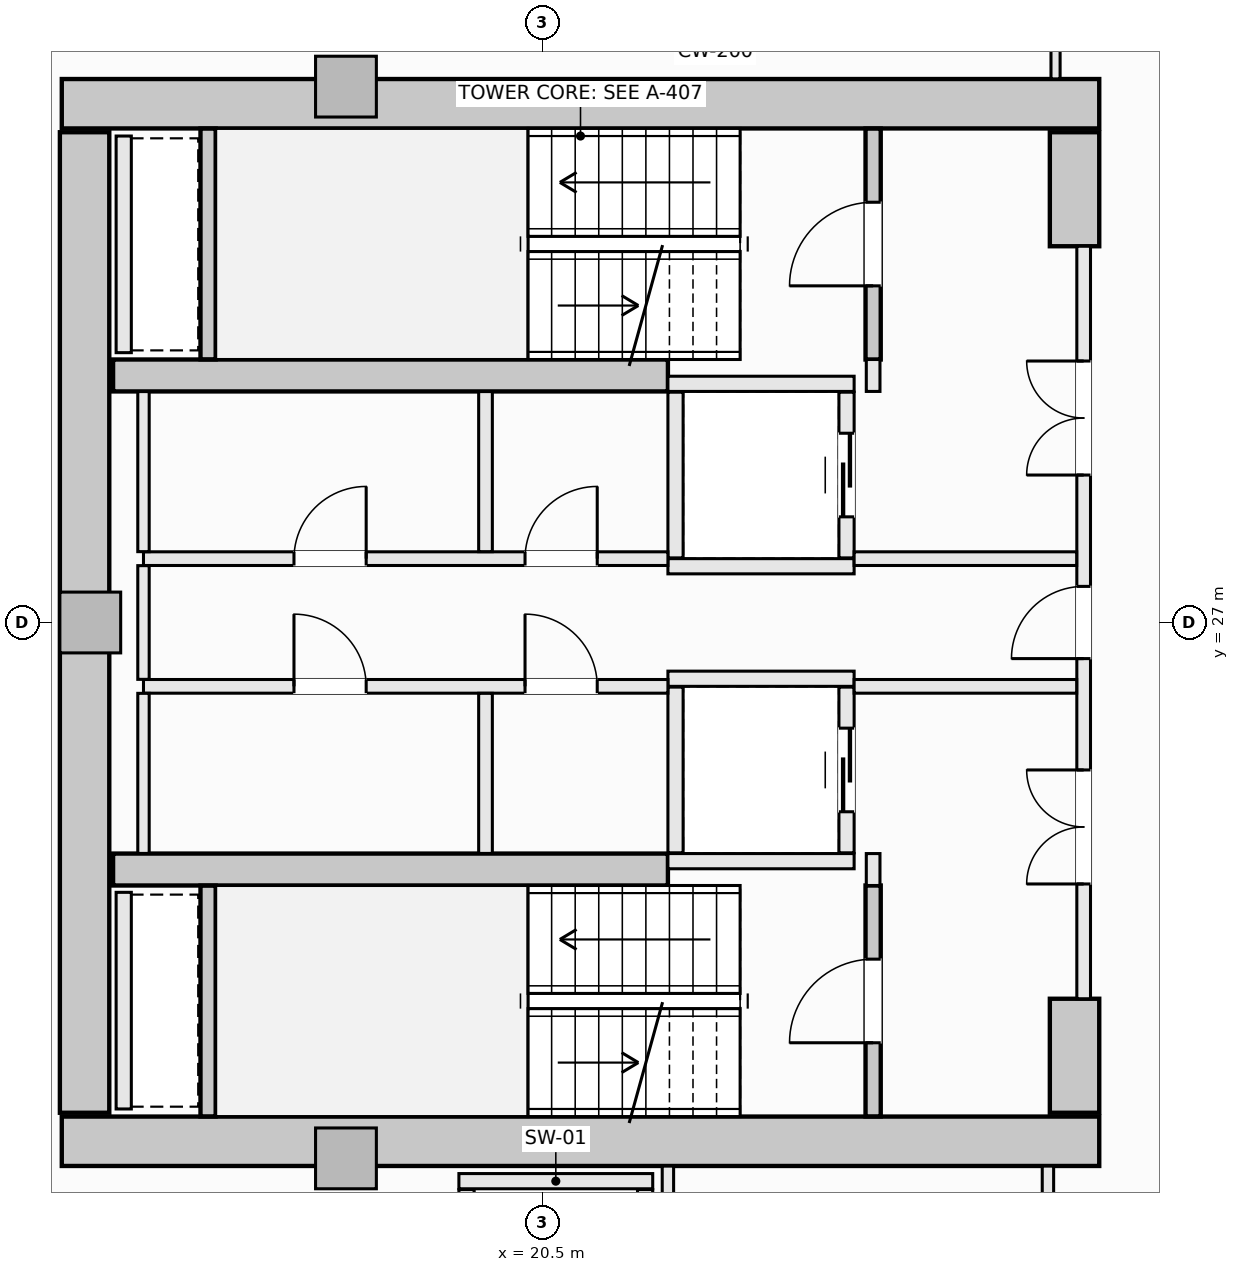
"""IFC4 building model, lengths in metres.
Left out: names, types, materials, properties, quantities, classifications, styles, units other than length and angle.
Written with IfcOpenShell. Run it as: python <this file> out.ifc"""

import sys

from ifc_helpers import new_model, si_unit, direction, frame, frame_2d, origin, origin_2d, place, context, subcontext, project, spatial, rectangle, extrude, element, fill, save


model = new_model("IFC4")
c1 = context("Model", 3, precision=1e-05, world=origin(), true_north=direction((0.0, 1.0)))
c2 = subcontext(c1, "Body", "Model", "MODEL_VIEW")
j1 = project(units=[si_unit("LENGTHUNIT", "METRE"), si_unit("PLANEANGLEUNIT", "RADIAN")], contexts=[c1])
p1 = place(None, origin())
s1 = spatial("IfcSite", under=j1, at=p1, CompositionType="ELEMENT")
p2 = place(p1, origin())
s2 = spatial("IfcBuilding", under=s1, at=p2, CompositionType="ELEMENT")
p3 = place(p2, frame((0.0, 0.0, 180.1)))
s3 = spatial("IfcBuildingStorey", under=s2, at=p3, CompositionType="ELEMENT", Elevation=180.1)
for number, where, z_axis, x_axis in (
    (1, (14.175, 33.825, -0.27), (0.0, 0.0, 1.0), (1.0, 0.0, 0.0)),
    (2, (14.175, 20.175, -0.27), (0.0, 0.0, 1.0), (1.0, 0.0, 0.0)),
):
    element("IfcWall", number, at=place(p3, frame(where, z_axis=z_axis, x_axis=x_axis)), inside=s3, PredefinedType="SHEAR", context=c2, shape_type="SweptSolid", body=[
        extrude(rectangle(XDim=13.65, YDim=0.65, at=frame_2d((6.825, 0.0))), origin(), (0.0, 0.0, 1.0), 3.4),
    ])
p4 = place(p3, frame((14.475, 20.55, -0.27), z_axis=(0.0, 0.0, 1.0), x_axis=(0.0, 1.0, 0.0)))
e3 = element("IfcWall", 3, at=p4, inside=s3, PredefinedType="SHEAR", context=c2, shape_type="SweptSolid", body=[
    extrude(rectangle(XDim=12.9, YDim=0.65, at=frame_2d((6.45, 0.0))), origin(), (0.0, 0.0, 1.0), 3.4),
])
for number, where, z_axis, x_axis in (
    (4, (27.5, 31.95, -0.27), (0.0, 0.0, 1.0), (0.0, 1.0, 0.0)),
    (5, (27.5, 20.55, -0.27), (0.0, 0.0, 1.0), (0.0, 1.0, 0.0)),
):
    element("IfcWall", number, at=place(p3, frame(where, z_axis=z_axis, x_axis=x_axis)), inside=s3, PredefinedType="SHEAR", context=c2, shape_type="SweptSolid", body=[
        extrude(rectangle(XDim=1.5, YDim=0.65, at=frame_2d((0.75, 0.0))), origin(), (0.0, 0.0, 1.0), 3.4),
    ])
for number, where, z_axis, x_axis in (
    (6, (14.85, 30.25, -0.27), (0.0, 0.0, 1.0), (1.0, 0.0, 0.0)),
    (7, (14.85, 23.75, -0.27), (0.0, 0.0, 1.0), (1.0, 0.0, 0.0)),
):
    element("IfcWall", number, at=place(p3, frame(where, z_axis=z_axis, x_axis=x_axis)), inside=s3, PredefinedType="SHEAR", context=c2, shape_type="SweptSolid", body=[
        extrude(rectangle(XDim=7.3, YDim=0.42, at=frame_2d((3.65, 0.0))), origin(), (0.0, 0.0, 1.0), 3.4),
    ])
for number, where, z_axis, x_axis in (
    (8, (17.914, 34.05, -0.27), (0.0, 0.0, 1.0), (1.0, 0.0, 0.0)),
    (9, (14.55, 27.0, -0.27), (0.0, 0.0, 1.0), (1.0, 0.0, 0.0)),
    (10, (17.914, 19.95, -0.27), (0.0, 0.0, 1.0), (1.0, 0.0, 0.0)),
):
    element("IfcColumn", number, at=place(p3, frame(where, z_axis=z_axis, x_axis=x_axis)), inside=s3, PredefinedType="PILASTER", context=c2, shape_type="SweptSolid", body=[
        extrude(rectangle(XDim=0.8, YDim=0.8, at=origin_2d()), origin(), (0.0, 0.0, 1.0), 3.4),
    ])
p5 = place(p3, frame((24.85, 30.46, -0.27), z_axis=(0.0, 0.0, 1.0), x_axis=(0.0, 1.0, 0.0)))
e11 = element("IfcWall", 11, at=p5, inside=s3, PredefinedType="SHEAR", context=c2, shape_type="SweptSolid", body=[
    extrude(rectangle(XDim=3.038, YDim=0.2, at=frame_2d((1.519, 0.0))), origin(), (0.0, 0.0, 1.0), 3.4),
])
p6 = place(p5, frame((0.969, 0.0, 0.27)))
e12 = element("IfcOpeningElement", 12, at=p6, cuts=e11, PredefinedType="OPENING", context=c2, shape_type="SweptSolid", body=[
    extrude(rectangle(XDim=1.1, YDim=2.15, at=frame_2d((0.55, 1.075))), frame((0.0, 0.11, 0.0), z_axis=(0.0, -1.0, 0.0), x_axis=(1.0, 0.0, 0.0)), (0.0, 0.0, 1.0), 0.22),
])
p7 = place(p3, frame((16.1, 30.462, -0.27), z_axis=(0.0, 0.0, 1.0), x_axis=(0.0, 1.0, 0.0)))
e13 = element("IfcWall", 13, at=p7, inside=s3, PredefinedType="SHEAR", context=c2, shape_type="SweptSolid", body=[
    extrude(rectangle(XDim=3.036, YDim=0.2, at=frame_2d((1.518, 0.0))), origin(), (0.0, 0.0, 1.0), 3.4),
])
p8 = place(p3, frame((24.85, 20.502, -0.27), z_axis=(0.0, 0.0, 1.0), x_axis=(0.0, 1.0, 0.0)))
e14 = element("IfcWall", 14, at=p8, inside=s3, PredefinedType="SHEAR", context=c2, shape_type="SweptSolid", body=[
    extrude(rectangle(XDim=3.038, YDim=0.2, at=frame_2d((1.519, 0.0))), origin(), (0.0, 0.0, 1.0), 3.4),
])
p9 = place(p8, frame((0.969, 0.0, 0.27)))
e15 = element("IfcOpeningElement", 15, at=p9, cuts=e14, PredefinedType="OPENING", context=c2, shape_type="SweptSolid", body=[
    extrude(rectangle(XDim=1.1, YDim=2.15, at=frame_2d((0.55, 1.075))), frame((0.0, 0.11, 0.0), z_axis=(0.0, -1.0, 0.0), x_axis=(1.0, 0.0, 0.0)), (0.0, 0.0, 1.0), 0.22),
])
p10 = place(p3, frame((16.1, 20.502, -0.27), z_axis=(0.0, 0.0, 1.0), x_axis=(0.0, 1.0, 0.0)))
e16 = element("IfcWall", 16, at=p10, inside=s3, PredefinedType="SHEAR", context=c2, shape_type="SweptSolid", body=[
    extrude(rectangle(XDim=3.036, YDim=0.2, at=frame_2d((1.518, 0.0))), origin(), (0.0, 0.0, 1.0), 3.4),
])
for number, where, z_axis, x_axis in (
    (17, (22.15, 30.14, 0.0), (0.0, 0.0, 1.0), (1.0, 0.0, 0.0)),
    (18, (22.15, 27.74, 0.0), (0.0, 0.0, 1.0), (1.0, 0.0, 0.0)),
):
    element("IfcWall", number, at=place(p3, frame(where, z_axis=z_axis, x_axis=x_axis)), inside=s3, PredefinedType="SOLIDWALL", context=c2, shape_type="SweptSolid", body=[
        extrude(rectangle(XDim=2.45, YDim=0.2, at=frame_2d((1.225, 0.0))), origin(), (0.0, 0.0, 1.0), 3.13),
    ])
p11 = place(p3, frame((22.25, 27.85, 0.0), z_axis=(0.0, 0.0, 1.0), x_axis=(0.0, 1.0, 0.0)))
e19 = element("IfcWall", 19, at=p11, inside=s3, PredefinedType="SOLIDWALL", context=c2, shape_type="SweptSolid", body=[
    extrude(rectangle(XDim=2.18, YDim=0.2, at=frame_2d((1.09, 0.0))), origin(), (0.0, 0.0, 1.0), 3.13),
])
p12 = place(p3, frame((24.5, 27.85, 0.0), z_axis=(0.0, 0.0, 1.0), x_axis=(0.0, 1.0, 0.0)))
e20 = element("IfcWall", 20, at=p12, inside=s3, PredefinedType="SOLIDWALL", context=c2, shape_type="SweptSolid", body=[
    extrude(rectangle(XDim=2.18, YDim=0.2, at=frame_2d((1.09, 0.0))), origin(), (0.0, 0.0, 1.0), 3.13),
])
p13 = place(p12, frame((0.54, 0.0, 0.0)))
e21 = element("IfcOpeningElement", 21, at=p13, cuts=e20, PredefinedType="OPENING", context=c2, shape_type="SweptSolid", body=[
    extrude(rectangle(XDim=1.1, YDim=2.2, at=frame_2d((0.55, 1.1))), frame((0.0, 0.11, 0.0), z_axis=(0.0, -1.0, 0.0), x_axis=(1.0, 0.0, 0.0)), (0.0, 0.0, 1.0), 0.22),
])
for number, where, z_axis, x_axis in (
    (22, (22.15, 26.26, 0.0), (0.0, 0.0, 1.0), (1.0, 0.0, 0.0)),
    (23, (22.15, 23.86, 0.0), (0.0, 0.0, 1.0), (1.0, 0.0, 0.0)),
):
    element("IfcWall", number, at=place(p3, frame(where, z_axis=z_axis, x_axis=x_axis)), inside=s3, PredefinedType="SOLIDWALL", context=c2, shape_type="SweptSolid", body=[
        extrude(rectangle(XDim=2.45, YDim=0.2, at=frame_2d((1.225, 0.0))), origin(), (0.0, 0.0, 1.0), 3.13),
    ])
p14 = place(p3, frame((22.25, 23.97, 0.0), z_axis=(0.0, 0.0, 1.0), x_axis=(0.0, 1.0, 0.0)))
e24 = element("IfcWall", 24, at=p14, inside=s3, PredefinedType="SOLIDWALL", context=c2, shape_type="SweptSolid", body=[
    extrude(rectangle(XDim=2.18, YDim=0.2, at=frame_2d((1.09, 0.0))), origin(), (0.0, 0.0, 1.0), 3.13),
])
p15 = place(p3, frame((24.5, 23.97, 0.0), z_axis=(0.0, 0.0, 1.0), x_axis=(0.0, 1.0, 0.0)))
e25 = element("IfcWall", 25, at=p15, inside=s3, PredefinedType="SOLIDWALL", context=c2, shape_type="SweptSolid", body=[
    extrude(rectangle(XDim=2.18, YDim=0.2, at=frame_2d((1.09, 0.0))), origin(), (0.0, 0.0, 1.0), 3.13),
])
p16 = place(p15, frame((0.54, 0.0, 0.0)))
e26 = element("IfcOpeningElement", 26, at=p16, cuts=e25, PredefinedType="OPENING", context=c2, shape_type="SweptSolid", body=[
    extrude(rectangle(XDim=1.1, YDim=2.2, at=frame_2d((0.55, 1.1))), frame((0.0, 0.11, 0.0), z_axis=(0.0, -1.0, 0.0), x_axis=(1.0, 0.0, 0.0)), (0.0, 0.0, 1.0), 0.22),
])
p17 = place(p3, frame((19.4, 19.65, 0.0), z_axis=(0.0, 0.0, 1.0), x_axis=(1.0, 0.0, 0.0)))
e27 = element("IfcWall", 27, at=p17, inside=s3, PredefinedType="SOLIDWALL", context=c2, shape_type="SweptSolid", body=[
    extrude(rectangle(XDim=2.55, YDim=0.2, at=frame_2d((1.275, 0.0))), origin(), (0.0, 0.0, 1.0), 3.13),
])
for number, where, z_axis, x_axis in (
    (28, (19.5, 17.01, 0.0), (0.0, 0.0, 1.0), (0.0, 1.0, 0.0)),
    (29, (21.85, 17.01, 0.0), (0.0, 0.0, 1.0), (0.0, 1.0, 0.0)),
):
    element("IfcWall", number, at=place(p3, frame(where, z_axis=z_axis, x_axis=x_axis)), inside=s3, PredefinedType="SOLIDWALL", context=c2, shape_type="SweptSolid", body=[
        extrude(rectangle(XDim=2.53, YDim=0.2, at=frame_2d((1.265, 0.0))), origin(), (0.0, 0.0, 1.0), 3.13),
    ])
for number, where, z_axis, x_axis in (
    (30, (14.99, 30.55, 0.0), (0.0, 0.0, 1.0), (0.0, 1.0, 0.0)),
    (31, (14.99, 20.6, 0.0), (0.0, 0.0, 1.0), (0.0, 1.0, 0.0)),
):
    element("IfcWall", number, at=place(p3, frame(where, z_axis=z_axis, x_axis=x_axis)), inside=s3, PredefinedType="SOLIDWALL", context=c2, shape_type="SweptSolid", body=[
        extrude(rectangle(XDim=2.85, YDim=0.2, at=frame_2d((1.425, 0.0))), origin(), (0.0, 0.0, 1.0), 3.13),
    ])
for number, where, z_axis, x_axis in (
    (32, (24.85, 23.54, 0.0), (0.0, 0.0, 1.0), (0.0, 1.0, 0.0)),
    (33, (24.85, 30.04, 0.0), (0.0, 0.0, 1.0), (0.0, 1.0, 0.0)),
):
    element("IfcWall", number, at=place(p3, frame(where, z_axis=z_axis, x_axis=x_axis)), inside=s3, PredefinedType="SOLIDWALL", context=c2, shape_type="SweptSolid", body=[
        extrude(rectangle(XDim=0.42, YDim=0.18, at=frame_2d((0.21, 0.0))), origin(), (0.0, 0.0, 1.0), 3.13),
    ])
p18 = place(p3, frame((27.62, 22.05, 0.0), z_axis=(0.0, 0.0, 1.0), x_axis=(0.0, 1.0, 0.0)))
e34 = element("IfcWall", 34, at=p18, inside=s3, PredefinedType="SOLIDWALL", context=c2, shape_type="SweptSolid", body=[
    extrude(rectangle(XDim=9.9, YDim=0.18, at=frame_2d((4.95, 0.0))), origin(), (0.0, 0.0, 1.0), 3.13),
])
p19 = place(p18, frame((4.475, 0.0, 0.0)))
e35 = element("IfcOpeningElement", 35, at=p19, cuts=e34, PredefinedType="OPENING", context=c2, shape_type="SweptSolid", body=[
    extrude(rectangle(XDim=0.95, YDim=2.1, at=frame_2d((0.475, 1.05))), frame((0.0, 0.1, 0.0), z_axis=(0.0, -1.0, 0.0), x_axis=(1.0, 0.0, 0.0)), (0.0, 0.0, 1.0), 0.2),
])
p20 = place(p18, frame((6.89, 0.0, 0.0)))
e36 = element("IfcOpeningElement", 36, at=p20, cuts=e34, PredefinedType="OPENING", context=c2, shape_type="SweptSolid", body=[
    extrude(rectangle(XDim=1.5, YDim=2.2, at=frame_2d((0.75, 1.1))), frame((0.0, 0.1, 0.0), z_axis=(0.0, -1.0, 0.0), x_axis=(1.0, 0.0, 0.0)), (0.0, 0.0, 1.0), 0.2),
])
p21 = place(p18, frame((1.51, 0.0, 0.0)))
e37 = element("IfcOpeningElement", 37, at=p21, cuts=e34, PredefinedType="OPENING", context=c2, shape_type="SweptSolid", body=[
    extrude(rectangle(XDim=1.5, YDim=2.2, at=frame_2d((0.75, 1.1))), frame((0.0, 0.1, 0.0), z_axis=(0.0, -1.0, 0.0), x_axis=(1.0, 0.0, 0.0)), (0.0, 0.0, 1.0), 0.2),
])
p22 = place(p3, frame((15.25, 27.84, 0.0), z_axis=(0.0, 0.0, 1.0), x_axis=(1.0, 0.0, 0.0)))
e38 = element("IfcWall", 38, at=p22, inside=s3, PredefinedType="SOLIDWALL", context=c2, shape_type="SweptSolid", body=[
    extrude(rectangle(XDim=6.9, YDim=0.18, at=frame_2d((3.45, 0.0))), origin(), (0.0, 0.0, 1.0), 3.13),
])
p23 = place(p22, frame((5.02, 0.0, 0.0)))
e39 = element("IfcOpeningElement", 39, at=p23, cuts=e38, PredefinedType="OPENING", context=c2, shape_type="SweptSolid", body=[
    extrude(rectangle(XDim=0.95, YDim=2.1, at=frame_2d((0.475, 1.05))), frame((0.0, 0.1, 0.0), z_axis=(0.0, -1.0, 0.0), x_axis=(1.0, 0.0, 0.0)), (0.0, 0.0, 1.0), 0.2),
])
p24 = place(p22, frame((1.98, 0.0, 0.0)))
e40 = element("IfcOpeningElement", 40, at=p24, cuts=e38, PredefinedType="OPENING", context=c2, shape_type="SweptSolid", body=[
    extrude(rectangle(XDim=0.95, YDim=2.1, at=frame_2d((0.475, 1.05))), frame((0.0, 0.1, 0.0), z_axis=(0.0, -1.0, 0.0), x_axis=(1.0, 0.0, 0.0)), (0.0, 0.0, 1.0), 0.2),
])
p25 = place(p3, frame((24.6, 27.84, 0.0), z_axis=(0.0, 0.0, 1.0), x_axis=(1.0, 0.0, 0.0)))
e41 = element("IfcWall", 41, at=p25, inside=s3, PredefinedType="SOLIDWALL", context=c2, shape_type="SweptSolid", body=[
    extrude(rectangle(XDim=2.928, YDim=0.18, at=frame_2d((1.464, 0.0))), origin(), (0.0, 0.0, 1.0), 3.13),
])
p26 = place(p3, frame((15.25, 26.16, 0.0), z_axis=(0.0, 0.0, 1.0), x_axis=(1.0, 0.0, 0.0)))
e42 = element("IfcWall", 42, at=p26, inside=s3, PredefinedType="SOLIDWALL", context=c2, shape_type="SweptSolid", body=[
    extrude(rectangle(XDim=6.9, YDim=0.18, at=frame_2d((3.45, 0.0))), origin(), (0.0, 0.0, 1.0), 3.13),
])
p27 = place(p26, frame((5.02, 0.0, 0.0)))
e43 = element("IfcOpeningElement", 43, at=p27, cuts=e42, PredefinedType="OPENING", context=c2, shape_type="SweptSolid", body=[
    extrude(rectangle(XDim=0.95, YDim=2.1, at=frame_2d((0.475, 1.05))), frame((0.0, 0.1, 0.0), z_axis=(0.0, -1.0, 0.0), x_axis=(1.0, 0.0, 0.0)), (0.0, 0.0, 1.0), 0.2),
])
p28 = place(p26, frame((1.98, 0.0, 0.0)))
e44 = element("IfcOpeningElement", 44, at=p28, cuts=e42, PredefinedType="OPENING", context=c2, shape_type="SweptSolid", body=[
    extrude(rectangle(XDim=0.95, YDim=2.1, at=frame_2d((0.475, 1.05))), frame((0.0, 0.1, 0.0), z_axis=(0.0, -1.0, 0.0), x_axis=(1.0, 0.0, 0.0)), (0.0, 0.0, 1.0), 0.2),
])
p29 = place(p3, frame((24.6, 26.16, 0.0), z_axis=(0.0, 0.0, 1.0), x_axis=(1.0, 0.0, 0.0)))
e45 = element("IfcWall", 45, at=p29, inside=s3, PredefinedType="SOLIDWALL", context=c2, shape_type="SweptSolid", body=[
    extrude(rectangle(XDim=2.928, YDim=0.18, at=frame_2d((1.464, 0.0))), origin(), (0.0, 0.0, 1.0), 3.13),
])
p30 = place(p3, frame((15.25, 23.962, 0.0), z_axis=(0.0, 0.0, 1.0), x_axis=(0.0, 1.0, 0.0)))
e46 = element("IfcWall", 46, at=p30, inside=s3, PredefinedType="PARTITIONING", context=c2, shape_type="SweptSolid", body=[
    extrude(rectangle(XDim=2.106, YDim=0.15, at=frame_2d((1.053, 0.0))), origin(), (0.0, 0.0, 1.0), 3.13),
])
p31 = place(p3, frame((15.25, 26.252, 0.0), z_axis=(0.0, 0.0, 1.0), x_axis=(0.0, 1.0, 0.0)))
e47 = element("IfcWall", 47, at=p31, inside=s3, PredefinedType="PARTITIONING", context=c2, shape_type="SweptSolid", body=[
    extrude(rectangle(XDim=1.496, YDim=0.15, at=frame_2d((0.748, 0.0))), origin(), (0.0, 0.0, 1.0), 3.13),
])
p32 = place(p3, frame((15.25, 27.932, 0.0), z_axis=(0.0, 0.0, 1.0), x_axis=(0.0, 1.0, 0.0)))
e48 = element("IfcWall", 48, at=p32, inside=s3, PredefinedType="PARTITIONING", context=c2, shape_type="SweptSolid", body=[
    extrude(rectangle(XDim=2.106, YDim=0.15, at=frame_2d((1.053, 0.0))), origin(), (0.0, 0.0, 1.0), 3.13),
])
for number, where, z_axis, x_axis in (
    (49, (19.75, 23.962, 0.0), (0.0, 0.0, 1.0), (0.0, 1.0, 0.0)),
    (50, (19.75, 27.932, 0.0), (0.0, 0.0, 1.0), (0.0, 1.0, 0.0)),
):
    element("IfcWall", number, at=place(p3, frame(where, z_axis=z_axis, x_axis=x_axis)), inside=s3, PredefinedType="SOLIDWALL", context=c2, shape_type="SweptSolid", body=[
        extrude(rectangle(XDim=2.106, YDim=0.18, at=frame_2d((1.053, 0.0))), origin(), (0.0, 0.0, 1.0), 3.13),
    ])
p33 = place(p3, frame((22.15, 17.127, 0.0), z_axis=(0.0, 0.0, 1.0), x_axis=(0.0, 1.0, 0.0)))
e51 = element("IfcWall", 51, at=p33, inside=s3, PredefinedType="PARTITIONING", context=c2, shape_type="SweptSolid", body=[
    extrude(rectangle(XDim=2.721, YDim=0.15, at=frame_2d((1.36, 0.0))), origin(), (0.0, 0.0, 1.0), 3.13),
])
p34 = place(p3, frame((27.15, 17.127, 0.0), z_axis=(0.0, 0.0, 1.0), x_axis=(0.0, 1.0, 0.0)))
e52 = element("IfcWall", 52, at=p34, inside=s3, PredefinedType="PARTITIONING", context=c2, shape_type="SweptSolid", body=[
    extrude(rectangle(XDim=2.721, YDim=0.15, at=frame_2d((1.36, 0.0))), origin(), (0.0, 0.0, 1.0), 3.13),
])
p35 = place(p34, frame((0.885, 0.0, 0.0)))
e53 = element("IfcOpeningElement", 53, at=p35, cuts=e52, PredefinedType="OPENING", context=c2, shape_type="SweptSolid", body=[
    extrude(rectangle(XDim=0.95, YDim=2.1, at=frame_2d((0.475, 1.05))), frame((0.0, 0.085, 0.0), z_axis=(0.0, -1.0, 0.0), x_axis=(1.0, 0.0, 0.0)), (0.0, 0.0, 1.0), 0.17),
])
p36 = place(p3, frame((27.25, 34.152, 0.0), z_axis=(0.0, 0.0, 1.0), x_axis=(0.0, 1.0, 0.0)))
e54 = element("IfcWall", 54, at=p36, inside=s3, PredefinedType="PARTITIONING", context=c2, shape_type="SweptSolid", body=[
    extrude(rectangle(XDim=0.806, YDim=0.12, at=frame_2d((0.403, 0.0))), origin(), (0.0, 0.0, 1.0), 3.13),
])
p37 = place(p6, origin())
e55 = element("IfcDoor", 55, at=p37, inside=s3, OperationType="SINGLE_SWING_LEFT", PredefinedType="DOOR", context=c2, shape_type="SweptSolid", body=[
    extrude(rectangle(XDim=1.1, YDim=2.15, at=frame_2d((0.55, 1.075))), frame((0.0, 0.025, 0.0), z_axis=(0.0, -1.0, 0.0), x_axis=(1.0, 0.0, 0.0)), (0.0, 0.0, 1.0), 0.05),
])
fill(e12, e55)
p38 = place(p9, origin())
e56 = element("IfcDoor", 56, at=p38, inside=s3, OperationType="SINGLE_SWING_LEFT", PredefinedType="DOOR", context=c2, shape_type="SweptSolid", body=[
    extrude(rectangle(XDim=1.1, YDim=2.15, at=frame_2d((0.55, 1.075))), frame((0.0, 0.025, 0.0), z_axis=(0.0, -1.0, 0.0), x_axis=(1.0, 0.0, 0.0)), (0.0, 0.0, 1.0), 0.05),
])
fill(e15, e56)
p39 = place(p13, origin())
e57 = element("IfcDoor", 57, at=p39, inside=s3, OperationType="SLIDING_TO_LEFT", PredefinedType="DOOR", context=c2, shape_type="SweptSolid", body=[
    extrude(rectangle(XDim=1.1, YDim=2.2, at=frame_2d((0.55, 1.1))), frame((0.0, 0.025, 0.0), z_axis=(0.0, -1.0, 0.0), x_axis=(1.0, 0.0, 0.0)), (0.0, 0.0, 1.0), 0.05),
])
fill(e21, e57)
p40 = place(p16, origin())
e58 = element("IfcDoor", 58, at=p40, inside=s3, OperationType="SLIDING_TO_LEFT", PredefinedType="DOOR", context=c2, shape_type="SweptSolid", body=[
    extrude(rectangle(XDim=1.1, YDim=2.2, at=frame_2d((0.55, 1.1))), frame((0.0, 0.025, 0.0), z_axis=(0.0, -1.0, 0.0), x_axis=(1.0, 0.0, 0.0)), (0.0, 0.0, 1.0), 0.05),
])
fill(e26, e58)
p41 = place(p19, origin())
e59 = element("IfcDoor", 59, at=p41, inside=s3, OperationType="SINGLE_SWING_LEFT", PredefinedType="DOOR", context=c2, shape_type="SweptSolid", body=[
    extrude(rectangle(XDim=0.95, YDim=2.1, at=frame_2d((0.475, 1.05))), frame((0.0, 0.025, 0.0), z_axis=(0.0, -1.0, 0.0), x_axis=(1.0, 0.0, 0.0)), (0.0, 0.0, 1.0), 0.05),
])
fill(e35, e59)
p42 = place(p20, origin())
e60 = element("IfcDoor", 60, at=p42, inside=s3, OperationType="DOUBLE_DOOR_SINGLE_SWING", PredefinedType="DOOR", context=c2, shape_type="SweptSolid", body=[
    extrude(rectangle(XDim=1.5, YDim=2.2, at=frame_2d((0.75, 1.1))), frame((0.0, 0.025, 0.0), z_axis=(0.0, -1.0, 0.0), x_axis=(1.0, 0.0, 0.0)), (0.0, 0.0, 1.0), 0.05),
])
fill(e36, e60)
p43 = place(p21, origin())
e61 = element("IfcDoor", 61, at=p43, inside=s3, OperationType="DOUBLE_DOOR_SINGLE_SWING", PredefinedType="DOOR", context=c2, shape_type="SweptSolid", body=[
    extrude(rectangle(XDim=1.5, YDim=2.2, at=frame_2d((0.75, 1.1))), frame((0.0, 0.025, 0.0), z_axis=(0.0, -1.0, 0.0), x_axis=(1.0, 0.0, 0.0)), (0.0, 0.0, 1.0), 0.05),
])
fill(e37, e61)
p44 = place(p23, origin())
e62 = element("IfcDoor", 62, at=p44, inside=s3, OperationType="SINGLE_SWING_RIGHT", PredefinedType="DOOR", context=c2, shape_type="SweptSolid", body=[
    extrude(rectangle(XDim=0.95, YDim=2.1, at=frame_2d((0.475, 1.05))), frame((0.0, 0.025, 0.0), z_axis=(0.0, -1.0, 0.0), x_axis=(1.0, 0.0, 0.0)), (0.0, 0.0, 1.0), 0.05),
])
fill(e39, e62)
p45 = place(p27, origin())
e63 = element("IfcDoor", 63, at=p45, inside=s3, OperationType="SINGLE_SWING_LEFT", PredefinedType="DOOR", context=c2, shape_type="SweptSolid", body=[
    extrude(rectangle(XDim=0.95, YDim=2.1, at=frame_2d((0.475, 1.05))), frame((0.0, 0.025, 0.0), z_axis=(0.0, -1.0, 0.0), x_axis=(1.0, 0.0, 0.0)), (0.0, 0.0, 1.0), 0.05),
])
fill(e43, e63)
p46 = place(p24, origin())
e64 = element("IfcDoor", 64, at=p46, inside=s3, OperationType="SINGLE_SWING_RIGHT", PredefinedType="DOOR", context=c2, shape_type="SweptSolid", body=[
    extrude(rectangle(XDim=0.95, YDim=2.1, at=frame_2d((0.475, 1.05))), frame((0.0, 0.025, 0.0), z_axis=(0.0, -1.0, 0.0), x_axis=(1.0, 0.0, 0.0)), (0.0, 0.0, 1.0), 0.05),
])
fill(e40, e64)
p47 = place(p28, origin())
e65 = element("IfcDoor", 65, at=p47, inside=s3, OperationType="SINGLE_SWING_LEFT", PredefinedType="DOOR", context=c2, shape_type="SweptSolid", body=[
    extrude(rectangle(XDim=0.95, YDim=2.1, at=frame_2d((0.475, 1.05))), frame((0.0, 0.025, 0.0), z_axis=(0.0, -1.0, 0.0), x_axis=(1.0, 0.0, 0.0)), (0.0, 0.0, 1.0), 0.05),
])
fill(e44, e65)
save(model, sys.argv[1])
